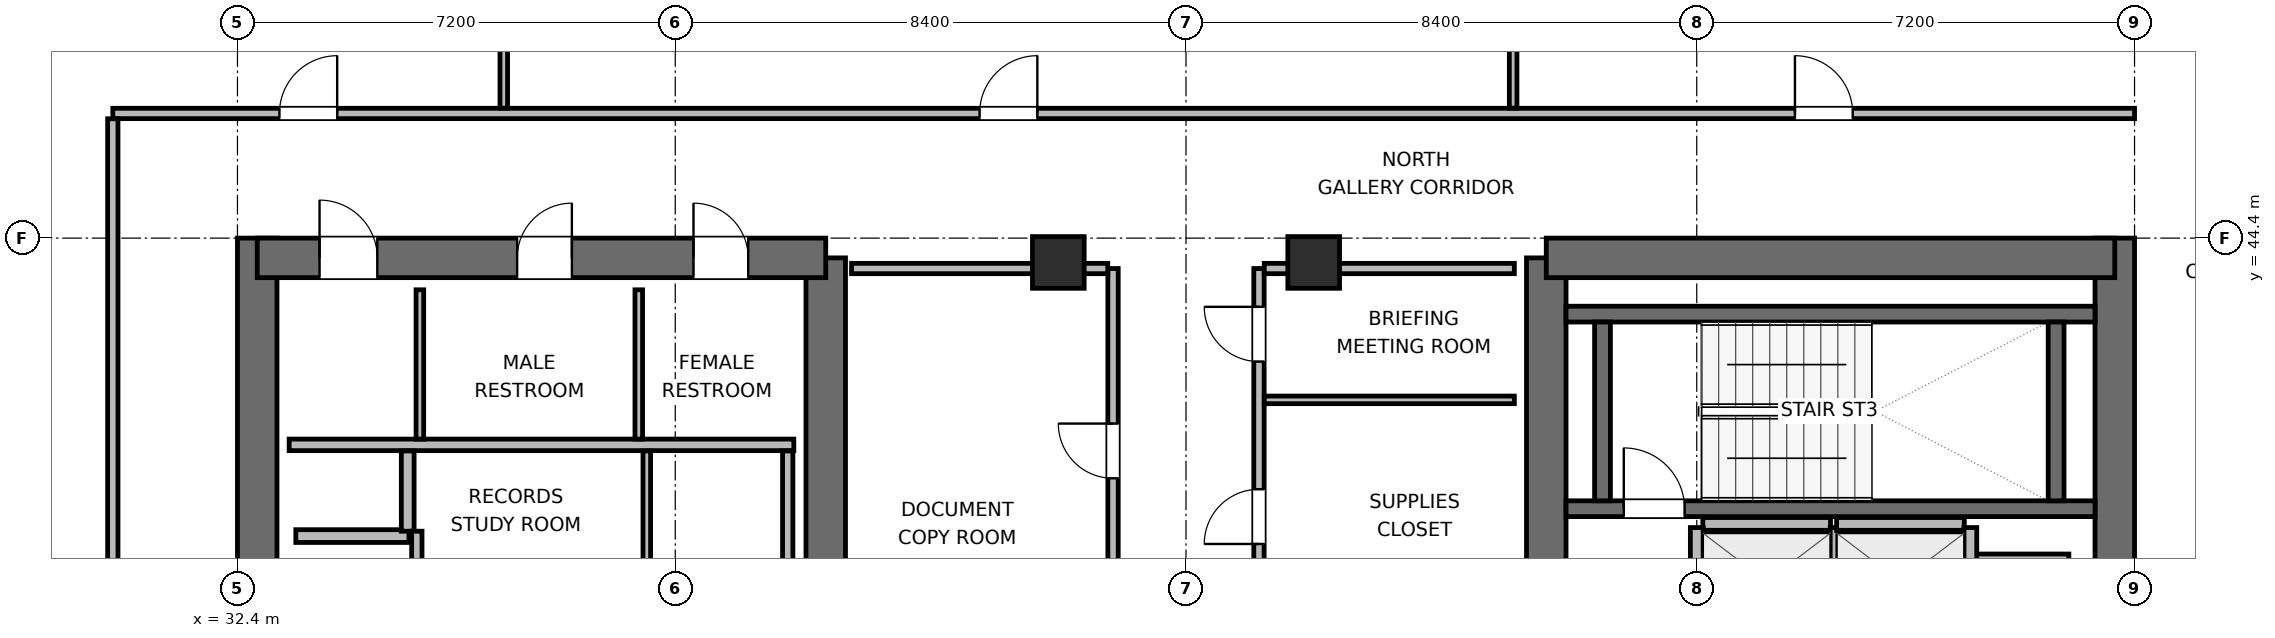
"""IFC4 building model, lengths in metres.
Left out: names, types, materials, properties, quantities, classifications, styles, units other than length and angle.
Written with IfcOpenShell. Run it as: python <this file> out.ifc"""

import sys

from ifc_helpers import new_model, si_unit, direction, frame, frame_2d, origin, origin_2d, place, context, subcontext, project, spatial, rectangle, extrude, element, fill, save


model = new_model("IFC4")
c1 = context("Model", 3, precision=1e-05, world=origin(), true_north=direction((0.0, 1.0)))
c2 = subcontext(c1, "Body", "Model", "MODEL_VIEW")
j1 = project(units=[si_unit("LENGTHUNIT", "METRE"), si_unit("PLANEANGLEUNIT", "RADIAN")], contexts=[c1])
p1 = place(None, origin())
s1 = spatial("IfcSite", under=j1, at=p1, CompositionType="ELEMENT")
p2 = place(p1, origin())
s2 = spatial("IfcBuilding", under=s1, at=p2, CompositionType="ELEMENT")
p3 = place(p2, frame((0.0, 0.0, 231.0)))
s3 = spatial("IfcBuildingStorey", under=s2, at=p3, CompositionType="ELEMENT", Elevation=231.0)
p4 = place(p3, frame((32.725, 27.6, 0.0), z_axis=(0.0, 0.0, 1.0), x_axis=(0.0, 1.0, 0.0)))
e1 = element("IfcWall", 1, at=p4, inside=s3, PredefinedType="SHEAR", context=c2, shape_type="SweptSolid", body=[
    extrude(rectangle(XDim=16.8, YDim=0.65, at=frame_2d((8.4, 0.0))), origin(), (0.0, 0.0, 1.0), 3.9),
])
p5 = place(p3, frame((42.075, 37.8, 0.0), z_axis=(0.0, 0.0, 1.0), x_axis=(0.0, 1.0, 0.0)))
e2 = element("IfcWall", 2, at=p5, inside=s3, PredefinedType="SHEAR", context=c2, shape_type="SweptSolid", body=[
    extrude(rectangle(XDim=6.275, YDim=0.65, at=frame_2d((3.137, 0.0))), origin(), (0.0, 0.0, 1.0), 3.9),
])
p6 = place(p3, frame((32.725, 44.075, 0.0), z_axis=(0.0, 0.0, 1.0), x_axis=(1.0, 0.0, 0.0)))
e3 = element("IfcWall", 3, at=p6, inside=s3, PredefinedType="SHEAR", context=c2, shape_type="SweptSolid", body=[
    extrude(rectangle(XDim=9.35, YDim=0.65, at=frame_2d((4.675, 0.0))), origin(), (0.0, 0.0, 1.0), 3.9),
])
p7 = place(p6, frame((1.025, 0.0, 0.0)))
e4 = element("IfcOpeningElement", 4, at=p7, cuts=e3, PredefinedType="OPENING", context=c2, shape_type="SweptSolid", body=[
    extrude(rectangle(XDim=0.95, YDim=2.04, at=frame_2d((0.475, 1.02))), frame((0.0, 0.335, 0.0), z_axis=(0.0, -1.0, 0.0), x_axis=(1.0, 0.0, 0.0)), (0.0, 0.0, 1.0), 0.67),
])
p8 = place(p6, frame((4.275, 0.0, 0.0)))
e5 = element("IfcOpeningElement", 5, at=p8, cuts=e3, PredefinedType="OPENING", context=c2, shape_type="SweptSolid", body=[
    extrude(rectangle(XDim=0.9, YDim=2.02, at=frame_2d((0.45, 1.01))), frame((0.0, 0.335, 0.0), z_axis=(0.0, -1.0, 0.0), x_axis=(1.0, 0.0, 0.0)), (0.0, 0.0, 1.0), 0.67),
])
p9 = place(p6, frame((7.175, 0.0, 0.0)))
e6 = element("IfcOpeningElement", 6, at=p9, cuts=e3, PredefinedType="OPENING", context=c2, shape_type="SweptSolid", body=[
    extrude(rectangle(XDim=0.9, YDim=2.02, at=frame_2d((0.45, 1.01))), frame((0.0, 0.335, 0.0), z_axis=(0.0, -1.0, 0.0), x_axis=(1.0, 0.0, 0.0)), (0.0, 0.0, 1.0), 0.67),
])
p10 = place(p3, frame((53.925, 38.0, 0.0), z_axis=(0.0, 0.0, 1.0), x_axis=(0.0, 1.0, 0.0)))
e7 = element("IfcWall", 7, at=p10, inside=s3, PredefinedType="SHEAR", context=c2, shape_type="SweptSolid", body=[
    extrude(rectangle(XDim=6.075, YDim=0.65, at=frame_2d((3.038, 0.0))), origin(), (0.0, 0.0, 1.0), 3.9),
])
p11 = place(p3, frame((63.275, 27.6, 0.0), z_axis=(0.0, 0.0, 1.0), x_axis=(0.0, 1.0, 0.0)))
e8 = element("IfcWall", 8, at=p11, inside=s3, PredefinedType="SHEAR", context=c2, shape_type="SweptSolid", body=[
    extrude(rectangle(XDim=16.8, YDim=0.65, at=frame_2d((8.4, 0.0))), origin(), (0.0, 0.0, 1.0), 3.9),
])
p12 = place(p3, frame((53.925, 44.075, 0.0), z_axis=(0.0, 0.0, 1.0), x_axis=(1.0, 0.0, 0.0)))
e9 = element("IfcWall", 9, at=p12, inside=s3, PredefinedType="SHEAR", context=c2, shape_type="SweptSolid", body=[
    extrude(rectangle(XDim=9.35, YDim=0.65, at=frame_2d((4.675, 0.0))), origin(), (0.0, 0.0, 1.0), 3.9),
])
p13 = place(p3, frame((54.25, 39.95, 0.0), z_axis=(0.0, 0.0, 1.0), x_axis=(1.0, 0.0, 0.0)))
e10 = element("IfcWall", 10, at=p13, inside=s3, PredefinedType="SHEAR", context=c2, shape_type="SweptSolid", body=[
    extrude(rectangle(XDim=8.7, YDim=0.26, at=frame_2d((4.35, 0.0))), origin(), (0.0, 0.0, 1.0), 3.9),
])
p14 = place(p13, frame((0.95, 0.0, 0.0)))
e11 = element("IfcOpeningElement", 11, at=p14, cuts=e10, PredefinedType="OPENING", context=c2, shape_type="SweptSolid", body=[
    extrude(rectangle(XDim=1.0, YDim=2.04, at=frame_2d((0.5, 1.02))), frame((0.0, 0.14, 0.0), z_axis=(0.0, -1.0, 0.0), x_axis=(1.0, 0.0, 0.0)), (0.0, 0.0, 1.0), 0.28),
])
p15 = place(p3, frame((54.25, 43.15, 0.0), z_axis=(0.0, 0.0, 1.0), x_axis=(1.0, 0.0, 0.0)))
e12 = element("IfcWall", 12, at=p15, inside=s3, PredefinedType="SHEAR", context=c2, shape_type="SweptSolid", body=[
    extrude(rectangle(XDim=8.7, YDim=0.26, at=frame_2d((4.35, 0.0))), origin(), (0.0, 0.0, 1.0), 3.9),
])
for number, where, z_axis, x_axis in (
    (13, (54.85, 40.08, 0.0), (0.0, 0.0, 1.0), (0.0, 1.0, 0.0)),
    (14, (62.31, 40.08, 0.0), (0.0, 0.0, 1.0), (0.0, 1.0, 0.0)),
):
    element("IfcWall", number, at=place(p3, frame(where, z_axis=z_axis, x_axis=x_axis)), inside=s3, PredefinedType="SHEAR", context=c2, shape_type="SweptSolid", body=[
        extrude(rectangle(XDim=2.94, YDim=0.26, at=frame_2d((1.47, 0.0))), origin(), (0.0, 0.0, 1.0), 3.9),
    ])
for number, where, z_axis, x_axis in (
    (15, (45.9, 44.0, 0.0), (0.0, 0.0, 1.0), (1.0, 0.0, 0.0)),
    (16, (50.1, 44.0, 0.0), (0.0, 0.0, 1.0), (1.0, 0.0, 0.0)),
):
    element("IfcColumn", number, at=place(p3, frame(where, z_axis=z_axis, x_axis=x_axis)), inside=s3, PredefinedType="COLUMN", context=c2, shape_type="SweptSolid", body=[
        extrude(rectangle(XDim=0.85, YDim=0.85, at=origin_2d()), origin(), (0.0, 0.0, 1.0), 3.9),
    ])
p16 = place(p3, frame((33.25, 41.0, 0.0), z_axis=(0.0, 0.0, 1.0), x_axis=(1.0, 0.0, 0.0)))
e17 = element("IfcWall", 17, at=p16, inside=s3, PredefinedType="PLUMBINGWALL", context=c2, shape_type="SweptSolid", body=[
    extrude(rectangle(XDim=8.3, YDim=0.19, at=frame_2d((4.15, 0.0))), origin(), (0.0, 0.0, 1.0), 3.68),
])
for number, where, z_axis, x_axis in (
    (18, (35.4, 41.095, 0.0), (0.0, 0.0, 1.0), (0.0, 1.0, 0.0)),
    (19, (39.0, 41.095, 0.0), (0.0, 0.0, 1.0), (0.0, 1.0, 0.0)),
):
    element("IfcWall", number, at=place(p3, frame(where, z_axis=z_axis, x_axis=x_axis)), inside=s3, PredefinedType="PARTITIONING", context=c2, shape_type="SweptSolid", body=[
        extrude(rectangle(XDim=2.455, YDim=0.125, at=frame_2d((1.228, 0.0))), origin(), (0.0, 0.0, 1.0), 3.68),
    ])
p17 = place(p3, frame((33.36, 39.5, 0.0), z_axis=(0.0, 0.0, 1.0), x_axis=(1.0, 0.0, 0.0)))
e20 = element("IfcWall", 20, at=p17, inside=s3, PredefinedType="PARTITIONING", context=c2, shape_type="SweptSolid", body=[
    extrude(rectangle(XDim=1.86, YDim=0.21, at=frame_2d((0.93, 0.0))), origin(), (0.0, 0.0, 1.0), 3.68),
])
p18 = place(p3, frame((35.2, 39.58, 0.0), z_axis=(0.0, 0.0, 1.0), x_axis=(0.0, 1.0, 0.0)))
e21 = element("IfcWall", 21, at=p18, inside=s3, PredefinedType="PARTITIONING", context=c2, shape_type="SweptSolid", body=[
    extrude(rectangle(XDim=1.32, YDim=0.21, at=frame_2d((0.66, 0.0))), origin(), (0.0, 0.0, 1.0), 3.68),
])
p19 = place(p3, frame((60.72, 39.1, 0.0), z_axis=(0.0, 0.0, 1.0), x_axis=(1.0, 0.0, 0.0)))
e22 = element("IfcWall", 22, at=p19, inside=s3, PredefinedType="PARTITIONING", context=c2, shape_type="SweptSolid", body=[
    extrude(rectangle(XDim=1.8, YDim=0.21, at=frame_2d((0.9, 0.0))), origin(), (0.0, 0.0, 1.0), 3.68),
])
p20 = place(p3, frame((56.5, 39.7, 0.0), z_axis=(0.0, 0.0, 1.0), x_axis=(1.0, 0.0, 0.0)))
e23 = element("IfcWall", 23, at=p20, inside=s3, PredefinedType="PARTITIONING", context=c2, shape_type="SweptSolid", body=[
    extrude(rectangle(XDim=2.1, YDim=0.21, at=frame_2d((1.05, 0.0))), origin(), (0.0, 0.0, 1.0), 3.68),
])
for number, where, z_axis, x_axis in (
    (24, (56.4, 37.86, 0.0), (0.0, 0.0, 1.0), (0.0, 1.0, 0.0)),
    (25, (58.7, 37.86, 0.0), (0.0, 0.0, 1.0), (0.0, 1.0, 0.0)),
):
    element("IfcWall", number, at=place(p3, frame(where, z_axis=z_axis, x_axis=x_axis)), inside=s3, PredefinedType="PARTITIONING", context=c2, shape_type="SweptSolid", body=[
        extrude(rectangle(XDim=1.78, YDim=0.21, at=frame_2d((0.89, 0.0))), origin(), (0.0, 0.0, 1.0), 3.68),
    ])
p21 = place(p3, frame((58.7, 39.7, 0.0), z_axis=(0.0, 0.0, 1.0), x_axis=(1.0, 0.0, 0.0)))
e26 = element("IfcWall", 26, at=p21, inside=s3, PredefinedType="PARTITIONING", context=c2, shape_type="SweptSolid", body=[
    extrude(rectangle(XDim=2.1, YDim=0.21, at=frame_2d((1.05, 0.0))), origin(), (0.0, 0.0, 1.0), 3.68),
])
p22 = place(p3, frame((60.9, 37.86, 0.0), z_axis=(0.0, 0.0, 1.0), x_axis=(0.0, 1.0, 0.0)))
e27 = element("IfcWall", 27, at=p22, inside=s3, PredefinedType="PARTITIONING", context=c2, shape_type="SweptSolid", body=[
    extrude(rectangle(XDim=1.78, YDim=0.21, at=frame_2d((0.89, 0.0))), origin(), (0.0, 0.0, 1.0), 3.68),
])
p23 = place(p3, frame((35.35, 38.087, 0.0), z_axis=(0.0, 0.0, 1.0), x_axis=(0.0, 1.0, 0.0)))
e28 = element("IfcWall", 28, at=p23, inside=s3, PredefinedType="PARTITIONING", context=c2, shape_type="SweptSolid", body=[
    extrude(rectangle(XDim=1.493, YDim=0.17, at=frame_2d((0.747, 0.0))), origin(), (0.0, 0.0, 1.0), 3.68),
])
p24 = place(p3, frame((41.45, 38.087, 0.0), z_axis=(0.0, 0.0, 1.0), x_axis=(0.0, 1.0, 0.0)))
e29 = element("IfcWall", 29, at=p24, inside=s3, PredefinedType="PARTITIONING", context=c2, shape_type="SweptSolid", body=[
    extrude(rectangle(XDim=2.813, YDim=0.17, at=frame_2d((1.406, 0.0))), origin(), (0.0, 0.0, 1.0), 3.68),
])
p25 = place(p3, frame((39.132, 38.087, 0.0), z_axis=(0.0, 0.0, 1.0), x_axis=(0.0, 1.0, 0.0)))
e30 = element("IfcWall", 30, at=p25, inside=s3, PredefinedType="PARTITIONING", context=c2, shape_type="SweptSolid", body=[
    extrude(rectangle(XDim=2.813, YDim=0.125, at=frame_2d((1.406, 0.0))), origin(), (0.0, 0.0, 1.0), 3.68),
])
p26 = place(p3, frame((46.8, 37.9, 0.0), z_axis=(0.0, 0.0, 1.0), x_axis=(0.0, 1.0, 0.0)))
e31 = element("IfcWall", 31, at=p26, inside=s3, PredefinedType="PARTITIONING", context=c2, shape_type="SweptSolid", body=[
    extrude(rectangle(XDim=6.0, YDim=0.17, at=frame_2d((3.0, 0.0))), origin(), (0.0, 0.0, 1.0), 3.68),
])
p27 = place(p26, frame((2.55, 0.0, 0.0)))
e32 = element("IfcOpeningElement", 32, at=p27, cuts=e31, PredefinedType="OPENING", context=c2, shape_type="SweptSolid", body=[
    extrude(rectangle(XDim=0.9, YDim=2.02, at=frame_2d((0.45, 1.01))), frame((0.0, 0.095, 0.0), z_axis=(0.0, -1.0, 0.0), x_axis=(1.0, 0.0, 0.0)), (0.0, 0.0, 1.0), 0.19),
])
p28 = place(p3, frame((42.5, 43.9, 0.0), z_axis=(0.0, 0.0, 1.0), x_axis=(1.0, 0.0, 0.0)))
e33 = element("IfcWall", 33, at=p28, inside=s3, PredefinedType="PARTITIONING", context=c2, shape_type="SweptSolid", body=[
    extrude(rectangle(XDim=4.213, YDim=0.17, at=frame_2d((2.106, 0.0))), origin(), (0.0, 0.0, 1.0), 2.765),
])
p29 = place(p3, frame((49.2, 37.9, 0.0), z_axis=(0.0, 0.0, 1.0), x_axis=(0.0, 1.0, 0.0)))
e34 = element("IfcWall", 34, at=p29, inside=s3, PredefinedType="PARTITIONING", context=c2, shape_type="SweptSolid", body=[
    extrude(rectangle(XDim=6.0, YDim=0.17, at=frame_2d((3.0, 0.0))), origin(), (0.0, 0.0, 1.0), 3.68),
])
p30 = place(p29, frame((1.47, 0.0, 0.0)))
e35 = element("IfcOpeningElement", 35, at=p30, cuts=e34, PredefinedType="OPENING", context=c2, shape_type="SweptSolid", body=[
    extrude(rectangle(XDim=0.9, YDim=2.02, at=frame_2d((0.45, 1.01))), frame((0.0, 0.095, 0.0), z_axis=(0.0, -1.0, 0.0), x_axis=(1.0, 0.0, 0.0)), (0.0, 0.0, 1.0), 0.19),
])
p31 = place(p29, frame((4.47, 0.0, 0.0)))
e36 = element("IfcOpeningElement", 36, at=p31, cuts=e34, PredefinedType="OPENING", context=c2, shape_type="SweptSolid", body=[
    extrude(rectangle(XDim=0.9, YDim=2.02, at=frame_2d((0.45, 1.01))), frame((0.0, 0.095, 0.0), z_axis=(0.0, -1.0, 0.0), x_axis=(1.0, 0.0, 0.0)), (0.0, 0.0, 1.0), 0.19),
])
p32 = place(p3, frame((49.287, 43.9, 0.0), z_axis=(0.0, 0.0, 1.0), x_axis=(1.0, 0.0, 0.0)))
e37 = element("IfcWall", 37, at=p32, inside=s3, PredefinedType="PARTITIONING", context=c2, shape_type="SweptSolid", body=[
    extrude(rectangle(XDim=4.113, YDim=0.17, at=frame_2d((2.056, 0.0))), origin(), (0.0, 0.0, 1.0), 2.765),
])
p33 = place(p3, frame((49.287, 41.74, 0.0), z_axis=(0.0, 0.0, 1.0), x_axis=(1.0, 0.0, 0.0)))
e38 = element("IfcWall", 38, at=p33, inside=s3, PredefinedType="PARTITIONING", context=c2, shape_type="SweptSolid", body=[
    extrude(rectangle(XDim=4.113, YDim=0.125, at=frame_2d((2.056, 0.0))), origin(), (0.0, 0.0, 1.0), 3.68),
])
p34 = place(p3, frame((30.35, 46.45, 0.0), z_axis=(0.0, 0.0, 1.0), x_axis=(1.0, 0.0, 0.0)))
e39 = element("IfcWall", 39, at=p34, inside=s3, PredefinedType="PARTITIONING", context=c2, shape_type="SweptSolid", body=[
    extrude(rectangle(XDim=33.25, YDim=0.17, at=frame_2d((16.625, 0.0))), origin(), (0.0, 0.0, 1.0), 3.68),
])
p35 = place(p34, frame((2.74, 0.0, 0.0)))
e40 = element("IfcOpeningElement", 40, at=p35, cuts=e39, PredefinedType="OPENING", context=c2, shape_type="SweptSolid", body=[
    extrude(rectangle(XDim=0.95, YDim=2.04, at=frame_2d((0.475, 1.02))), frame((0.0, 0.095, 0.0), z_axis=(0.0, -1.0, 0.0), x_axis=(1.0, 0.0, 0.0)), (0.0, 0.0, 1.0), 0.19),
])
p36 = place(p34, frame((14.255, 0.0, 0.0)))
e41 = element("IfcOpeningElement", 41, at=p36, cuts=e39, PredefinedType="OPENING", context=c2, shape_type="SweptSolid", body=[
    extrude(rectangle(XDim=0.95, YDim=2.04, at=frame_2d((0.475, 1.02))), frame((0.0, 0.095, 0.0), z_axis=(0.0, -1.0, 0.0), x_axis=(1.0, 0.0, 0.0)), (0.0, 0.0, 1.0), 0.19),
])
p37 = place(p34, frame((27.665, 0.0, 0.0)))
e42 = element("IfcOpeningElement", 42, at=p37, cuts=e39, PredefinedType="OPENING", context=c2, shape_type="SweptSolid", body=[
    extrude(rectangle(XDim=0.95, YDim=2.04, at=frame_2d((0.475, 1.02))), frame((0.0, 0.095, 0.0), z_axis=(0.0, -1.0, 0.0), x_axis=(1.0, 0.0, 0.0)), (0.0, 0.0, 1.0), 0.19),
])
p38 = place(p3, frame((30.35, 25.637, 0.0), z_axis=(0.0, 0.0, 1.0), x_axis=(0.0, 1.0, 0.0)))
e43 = element("IfcWall", 43, at=p38, inside=s3, PredefinedType="PARTITIONING", context=c2, shape_type="SweptSolid", body=[
    extrude(rectangle(XDim=20.726, YDim=0.17, at=frame_2d((10.363, 0.0))), origin(), (0.0, 0.0, 1.0), 3.68),
])
p39 = place(p38, frame((9.888, 0.0, 0.0)))
e44 = element("IfcOpeningElement", 44, at=p39, cuts=e43, PredefinedType="OPENING", context=c2, shape_type="SweptSolid", body=[
    extrude(rectangle(XDim=0.95, YDim=2.04, at=frame_2d((0.475, 1.02))), frame((0.0, 0.095, 0.0), z_axis=(0.0, -1.0, 0.0), x_axis=(1.0, 0.0, 0.0)), (0.0, 0.0, 1.0), 0.19),
])
p40 = place(p3, frame((36.78, 46.537, 0.0), z_axis=(0.0, 0.0, 1.0), x_axis=(0.0, 1.0, 0.0)))
e45 = element("IfcWall", 45, at=p40, inside=s3, PredefinedType="PARTITIONING", context=c2, shape_type="SweptSolid", body=[
    extrude(rectangle(XDim=15.628, YDim=0.125, at=frame_2d((7.814, 0.0))), origin(), (0.0, 0.0, 1.0), 3.68),
])
p41 = place(p3, frame((53.38, 46.537, 0.0), z_axis=(0.0, 0.0, 1.0), x_axis=(0.0, 1.0, 0.0)))
e46 = element("IfcWall", 46, at=p41, inside=s3, PredefinedType="PARTITIONING", context=c2, shape_type="SweptSolid", body=[
    extrude(rectangle(XDim=12.223, YDim=0.125, at=frame_2d((6.111, 0.0))), origin(), (0.0, 0.0, 1.0), 3.043),
])
p42 = place(p14, origin())
e47 = element("IfcDoor", 47, at=p42, inside=s3, OperationType="SINGLE_SWING_LEFT", PredefinedType="DOOR", context=c2, shape_type="SweptSolid", body=[
    extrude(rectangle(XDim=1.0, YDim=2.04, at=frame_2d((0.5, 1.02))), frame((0.0, 0.025, 0.0), z_axis=(0.0, -1.0, 0.0), x_axis=(1.0, 0.0, 0.0)), (0.0, 0.0, 1.0), 0.05),
])
fill(e11, e47)
p43 = place(p7, origin())
e48 = element("IfcDoor", 48, at=p43, inside=s3, OperationType="SINGLE_SWING_LEFT", PredefinedType="DOOR", context=c2, shape_type="SweptSolid", body=[
    extrude(rectangle(XDim=0.95, YDim=2.04, at=frame_2d((0.475, 1.02))), frame((0.0, 0.025, 0.0), z_axis=(0.0, -1.0, 0.0), x_axis=(1.0, 0.0, 0.0)), (0.0, 0.0, 1.0), 0.05),
])
fill(e4, e48)
p44 = place(p8, origin())
e49 = element("IfcDoor", 49, at=p44, inside=s3, OperationType="SINGLE_SWING_RIGHT", PredefinedType="DOOR", context=c2, shape_type="SweptSolid", body=[
    extrude(rectangle(XDim=0.9, YDim=2.02, at=frame_2d((0.45, 1.01))), frame((0.0, 0.025, 0.0), z_axis=(0.0, -1.0, 0.0), x_axis=(1.0, 0.0, 0.0)), (0.0, 0.0, 1.0), 0.05),
])
fill(e5, e49)
p45 = place(p9, origin())
e50 = element("IfcDoor", 50, at=p45, inside=s3, OperationType="SINGLE_SWING_LEFT", PredefinedType="DOOR", context=c2, shape_type="SweptSolid", body=[
    extrude(rectangle(XDim=0.9, YDim=2.02, at=frame_2d((0.45, 1.01))), frame((0.0, 0.025, 0.0), z_axis=(0.0, -1.0, 0.0), x_axis=(1.0, 0.0, 0.0)), (0.0, 0.0, 1.0), 0.05),
])
fill(e6, e50)
p46 = place(p27, origin())
e51 = element("IfcDoor", 51, at=p46, inside=s3, OperationType="SINGLE_SWING_RIGHT", PredefinedType="DOOR", context=c2, shape_type="SweptSolid", body=[
    extrude(rectangle(XDim=0.9, YDim=2.02, at=frame_2d((0.45, 1.01))), frame((0.0, 0.025, 0.0), z_axis=(0.0, -1.0, 0.0), x_axis=(1.0, 0.0, 0.0)), (0.0, 0.0, 1.0), 0.05),
])
fill(e32, e51)
p47 = place(p30, origin())
e52 = element("IfcDoor", 52, at=p47, inside=s3, OperationType="SINGLE_SWING_LEFT", PredefinedType="DOOR", context=c2, shape_type="SweptSolid", body=[
    extrude(rectangle(XDim=0.9, YDim=2.02, at=frame_2d((0.45, 1.01))), frame((0.0, 0.025, 0.0), z_axis=(0.0, -1.0, 0.0), x_axis=(1.0, 0.0, 0.0)), (0.0, 0.0, 1.0), 0.05),
])
fill(e35, e52)
p48 = place(p31, origin())
e53 = element("IfcDoor", 53, at=p48, inside=s3, OperationType="SINGLE_SWING_RIGHT", PredefinedType="DOOR", context=c2, shape_type="SweptSolid", body=[
    extrude(rectangle(XDim=0.9, YDim=2.02, at=frame_2d((0.45, 1.01))), frame((0.0, 0.025, 0.0), z_axis=(0.0, -1.0, 0.0), x_axis=(1.0, 0.0, 0.0)), (0.0, 0.0, 1.0), 0.05),
])
fill(e36, e53)
p49 = place(p35, origin())
e54 = element("IfcDoor", 54, at=p49, inside=s3, OperationType="SINGLE_SWING_RIGHT", PredefinedType="DOOR", context=c2, shape_type="SweptSolid", body=[
    extrude(rectangle(XDim=0.95, YDim=2.04, at=frame_2d((0.475, 1.02))), frame((0.0, 0.025, 0.0), z_axis=(0.0, -1.0, 0.0), x_axis=(1.0, 0.0, 0.0)), (0.0, 0.0, 1.0), 0.05),
])
fill(e40, e54)
p50 = place(p36, origin())
e55 = element("IfcDoor", 55, at=p50, inside=s3, OperationType="SINGLE_SWING_RIGHT", PredefinedType="DOOR", context=c2, shape_type="SweptSolid", body=[
    extrude(rectangle(XDim=0.95, YDim=2.04, at=frame_2d((0.475, 1.02))), frame((0.0, 0.025, 0.0), z_axis=(0.0, -1.0, 0.0), x_axis=(1.0, 0.0, 0.0)), (0.0, 0.0, 1.0), 0.05),
])
fill(e41, e55)
p51 = place(p37, origin())
e56 = element("IfcDoor", 56, at=p51, inside=s3, OperationType="SINGLE_SWING_LEFT", PredefinedType="DOOR", context=c2, shape_type="SweptSolid", body=[
    extrude(rectangle(XDim=0.95, YDim=2.04, at=frame_2d((0.475, 1.02))), frame((0.0, 0.025, 0.0), z_axis=(0.0, -1.0, 0.0), x_axis=(1.0, 0.0, 0.0)), (0.0, 0.0, 1.0), 0.05),
])
fill(e42, e56)
save(model, sys.argv[1])
